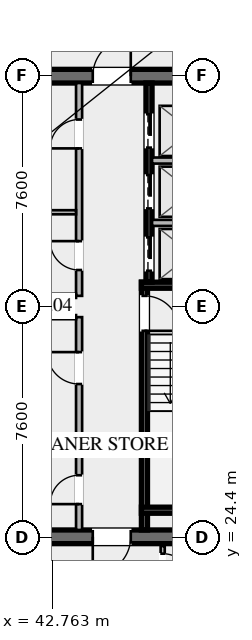
"""IFC4 building model, lengths in metres.
Left out: names, types, materials, properties, quantities, classifications, styles, units other than length and angle.
Written with IfcOpenShell. Run it as: python <this file> out.ifc"""

import sys

from ifc_helpers import new_model, si_unit, direction, frame, frame_2d, origin, place, context, subcontext, project, spatial, rectangle, extrude, element, fill, save


model = new_model("IFC4")
c1 = context("Model", 3, precision=1e-05, world=origin(), true_north=direction((0.0, 1.0)))
c2 = subcontext(c1, "Body", "Model", "MODEL_VIEW")
j1 = project(units=[si_unit("LENGTHUNIT", "METRE"), si_unit("PLANEANGLEUNIT", "RADIAN")], contexts=[c1])
p1 = place(None, origin())
s1 = spatial("IfcSite", under=j1, at=p1, CompositionType="ELEMENT")
p2 = place(p1, origin())
s2 = spatial("IfcBuilding", under=s1, at=p2, CompositionType="ELEMENT")
p3 = place(p2, frame((0.0, 0.0, 263.4)))
s3 = spatial("IfcBuildingStorey", under=s2, at=p3, CompositionType="ELEMENT", Elevation=263.4)
p4 = place(p3, frame((49.35, 24.425, 0.0), z_axis=(0.0, 0.0, 1.0), x_axis=(-1.0, 0.0, 0.0)))
e1 = element("IfcWall", 1, at=p4, inside=s3, PredefinedType="SHEAR", context=c2, shape_type="SweptSolid", body=[
    extrude(rectangle(XDim=14.7, YDim=0.45, at=frame_2d((7.35, 0.0))), origin(), (0.0, 0.0, 1.0), 3.55),
])
p5 = place(p4, frame((9.05, 0.0, 0.0)))
e2 = element("IfcOpeningElement", 2, at=p5, cuts=e1, PredefinedType="OPENING", context=c2, shape_type="SweptSolid", body=[
    extrude(rectangle(XDim=1.25, YDim=2.25, at=frame_2d((0.625, 1.125))), frame((0.0, 0.235, 0.0), z_axis=(0.0, -1.0, 0.0), x_axis=(1.0, 0.0, 0.0)), (0.0, 0.0, 1.0), 0.47),
])
p6 = place(p4, frame((4.0, 0.0, 0.0)))
e3 = element("IfcOpeningElement", 3, at=p6, cuts=e1, PredefinedType="OPENING", context=c2, shape_type="SweptSolid", body=[
    extrude(rectangle(XDim=1.25, YDim=2.25, at=frame_2d((0.625, 1.125))), frame((0.0, 0.235, 0.0), z_axis=(0.0, -1.0, 0.0), x_axis=(1.0, 0.0, 0.0)), (0.0, 0.0, 1.0), 0.47),
])
p7 = place(p3, frame((34.65, 39.575, 0.0), z_axis=(0.0, 0.0, 1.0), x_axis=(1.0, 0.0, 0.0)))
e4 = element("IfcWall", 4, at=p7, inside=s3, PredefinedType="SHEAR", context=c2, shape_type="SweptSolid", body=[
    extrude(rectangle(XDim=14.7, YDim=0.45, at=frame_2d((7.35, 0.0))), origin(), (0.0, 0.0, 1.0), 3.55),
])
p8 = place(p7, frame((4.4, 0.0, 0.0)))
e5 = element("IfcOpeningElement", 5, at=p8, cuts=e4, PredefinedType="OPENING", context=c2, shape_type="SweptSolid", body=[
    extrude(rectangle(XDim=1.25, YDim=2.25, at=frame_2d((0.625, 1.125))), frame((0.0, 0.235, 0.0), z_axis=(0.0, -1.0, 0.0), x_axis=(1.0, 0.0, 0.0)), (0.0, 0.0, 1.0), 0.47),
])
p9 = place(p7, frame((9.45, 0.0, 0.0)))
e6 = element("IfcOpeningElement", 6, at=p9, cuts=e4, PredefinedType="OPENING", context=c2, shape_type="SweptSolid", body=[
    extrude(rectangle(XDim=1.25, YDim=2.25, at=frame_2d((0.625, 1.125))), frame((0.0, 0.235, 0.0), z_axis=(0.0, -1.0, 0.0), x_axis=(1.0, 0.0, 0.0)), (0.0, 0.0, 1.0), 0.47),
])
p10 = place(p3, frame((45.8, 32.8, 0.0), z_axis=(0.0, 0.0, 1.0), x_axis=(0.0, -1.0, 0.0)))
e7 = element("IfcWall", 7, at=p10, inside=s3, PredefinedType="SHEAR", context=c2, shape_type="SweptSolid", body=[
    extrude(rectangle(XDim=8.15, YDim=0.2, at=frame_2d((4.075, 0.0))), origin(), (0.0, 0.0, 1.0), 3.37),
])
p11 = place(p10, frame((0.45, 0.0, 0.0)))
e8 = element("IfcOpeningElement", 8, at=p11, cuts=e7, PredefinedType="OPENING", context=c2, shape_type="SweptSolid", body=[
    extrude(rectangle(XDim=1.15, YDim=2.2, at=frame_2d((0.575, 1.1))), frame((0.0, 0.11, 0.0), z_axis=(0.0, -1.0, 0.0), x_axis=(1.0, 0.0, 0.0)), (0.0, 0.0, 1.0), 0.22),
])
for number, where, z_axis, x_axis in (
    (9, (45.7, 32.7, 0.0), (0.0, 0.0, 1.0), (1.0, 0.0, 0.0)),
    (10, (45.7, 25.3, 0.0), (0.0, 0.0, 1.0), (1.0, 0.0, 0.0)),
):
    element("IfcWall", number, at=place(p3, frame(where, z_axis=z_axis, x_axis=x_axis)), inside=s3, PredefinedType="SHEAR", context=c2, shape_type="SweptSolid", body=[
        extrude(rectangle(XDim=3.65, YDim=0.2, at=frame_2d((1.825, 0.0))), origin(), (0.0, 0.0, 1.0), 3.37),
    ])
p12 = place(p3, frame((45.95, 39.35, 0.0), z_axis=(0.0, 0.0, 1.0), x_axis=(0.0, -1.0, 0.0)))
e11 = element("IfcWall", 11, at=p12, inside=s3, PredefinedType="SHEAR", context=c2, shape_type="SweptSolid", body=[
    extrude(rectangle(XDim=6.55, YDim=0.2, at=frame_2d((3.275, 0.0))), origin(), (0.0, 0.0, 1.0), 3.37),
])
p13 = place(p12, frame((5.075, 0.0, 0.0)))
e12 = element("IfcOpeningElement", 12, at=p13, cuts=e11, PredefinedType="OPENING", context=c2, shape_type="SweptSolid", body=[
    extrude(rectangle(XDim=1.1, YDim=2.2, at=frame_2d((0.55, 1.1))), frame((0.0, 0.11, 0.0), z_axis=(0.0, -1.0, 0.0), x_axis=(1.0, 0.0, 0.0)), (0.0, 0.0, 1.0), 0.22),
])
p14 = place(p12, frame((3.025, 0.0, 0.0)))
e13 = element("IfcOpeningElement", 13, at=p14, cuts=e11, PredefinedType="OPENING", context=c2, shape_type="SweptSolid", body=[
    extrude(rectangle(XDim=1.1, YDim=2.2, at=frame_2d((0.55, 1.1))), frame((0.0, 0.11, 0.0), z_axis=(0.0, -1.0, 0.0), x_axis=(1.0, 0.0, 0.0)), (0.0, 0.0, 1.0), 0.22),
])
p15 = place(p12, frame((1.025, 0.0, 0.0)))
e14 = element("IfcOpeningElement", 14, at=p15, cuts=e11, PredefinedType="OPENING", context=c2, shape_type="SweptSolid", body=[
    extrude(rectangle(XDim=1.1, YDim=2.2, at=frame_2d((0.55, 1.1))), frame((0.0, 0.11, 0.0), z_axis=(0.0, -1.0, 0.0), x_axis=(1.0, 0.0, 0.0)), (0.0, 0.0, 1.0), 0.22),
])
for number, where, z_axis, x_axis in (
    (15, (46.05, 34.75, 0.0), (0.0, 0.0, 1.0), (1.0, 0.0, 0.0)),
    (16, (46.05, 36.8, 0.0), (0.0, 0.0, 1.0), (1.0, 0.0, 0.0)),
):
    element("IfcWall", number, at=place(p3, frame(where, z_axis=z_axis, x_axis=x_axis)), inside=s3, PredefinedType="SOLIDWALL", context=c2, shape_type="SweptSolid", body=[
        extrude(rectangle(XDim=3.3, YDim=0.2, at=frame_2d((1.65, 0.0))), origin(), (0.0, 0.0, 1.0), 3.37),
    ])
p16 = place(p3, frame((43.65, 24.65, 0.0), z_axis=(0.0, 0.0, 1.0), x_axis=(0.0, 1.0, 0.0)))
e17 = element("IfcWall", 17, at=p16, inside=s3, PredefinedType="SOLIDWALL", context=c2, shape_type="SweptSolid", body=[
    extrude(rectangle(XDim=7.0, YDim=0.2, at=frame_2d((3.5, 0.0))), origin(), (0.0, 0.0, 1.0), 2.723),
])
p17 = place(p16, frame((0.85, 0.0, 0.0)))
e18 = element("IfcOpeningElement", 18, at=p17, cuts=e17, PredefinedType="OPENING", context=c2, shape_type="SweptSolid", body=[
    extrude(rectangle(XDim=0.95, YDim=2.05, at=frame_2d((0.475, 1.025))), frame((0.0, 0.11, 0.0), z_axis=(0.0, -1.0, 0.0), x_axis=(1.0, 0.0, 0.0)), (0.0, 0.0, 1.0), 0.22),
])
p18 = place(p16, frame((4.8, 0.0, 0.0)))
e19 = element("IfcOpeningElement", 19, at=p18, cuts=e17, PredefinedType="OPENING", context=c2, shape_type="SweptSolid", body=[
    extrude(rectangle(XDim=1.05, YDim=2.2, at=frame_2d((0.525, 1.1))), frame((0.0, 0.11, 0.0), z_axis=(0.0, -1.0, 0.0), x_axis=(1.0, 0.0, 0.0)), (0.0, 0.0, 1.0), 0.22),
])
for number, where, z_axis, x_axis in (
    (20, (41.67, 31.65, 0.0), (0.0, 0.0, 1.0), (1.0, 0.0, 0.0)),
    (21, (41.67, 27.6, 0.0), (0.0, 0.0, 1.0), (1.0, 0.0, 0.0)),
):
    element("IfcWall", number, at=place(p3, frame(where, z_axis=z_axis, x_axis=x_axis)), inside=s3, PredefinedType="PARTITIONING", context=c2, shape_type="SweptSolid", body=[
        extrude(rectangle(XDim=1.88, YDim=0.135, at=frame_2d((0.94, 0.0))), origin(), (0.0, 0.0, 1.0), 2.723),
    ])
p19 = place(p3, frame((43.65, 32.35, 0.0), z_axis=(0.0, 0.0, 1.0), x_axis=(0.0, 1.0, 0.0)))
e22 = element("IfcWall", 22, at=p19, inside=s3, PredefinedType="SOLIDWALL", context=c2, shape_type="SweptSolid", body=[
    extrude(rectangle(XDim=7.0, YDim=0.2, at=frame_2d((3.5, 0.0))), origin(), (0.0, 0.0, 1.0), 2.723),
])
p20 = place(p19, frame((0.85, 0.0, 0.0)))
e23 = element("IfcOpeningElement", 23, at=p20, cuts=e22, PredefinedType="OPENING", context=c2, shape_type="SweptSolid", body=[
    extrude(rectangle(XDim=0.95, YDim=2.05, at=frame_2d((0.475, 1.025))), frame((0.0, 0.11, 0.0), z_axis=(0.0, -1.0, 0.0), x_axis=(1.0, 0.0, 0.0)), (0.0, 0.0, 1.0), 0.22),
])
p21 = place(p19, frame((4.85, 0.0, 0.0)))
e24 = element("IfcOpeningElement", 24, at=p21, cuts=e22, PredefinedType="OPENING", context=c2, shape_type="SweptSolid", body=[
    extrude(rectangle(XDim=0.95, YDim=2.05, at=frame_2d((0.475, 1.025))), frame((0.0, 0.11, 0.0), z_axis=(0.0, -1.0, 0.0), x_axis=(1.0, 0.0, 0.0)), (0.0, 0.0, 1.0), 0.22),
])
for number, where, z_axis, x_axis in (
    (25, (41.67, 32.35, 0.0), (0.0, 0.0, 1.0), (1.0, 0.0, 0.0)),
    (26, (41.67, 35.1, 0.0), (0.0, 0.0, 1.0), (1.0, 0.0, 0.0)),
):
    element("IfcWall", number, at=place(p3, frame(where, z_axis=z_axis, x_axis=x_axis)), inside=s3, PredefinedType="PARTITIONING", context=c2, shape_type="SweptSolid", body=[
        extrude(rectangle(XDim=1.88, YDim=0.135, at=frame_2d((0.94, 0.0))), origin(), (0.0, 0.0, 1.0), 2.723),
    ])
p22 = place(p3, frame((46.4, 24.12, 0.0), z_axis=(0.0, 0.0, 1.0), x_axis=(0.0, -1.0, 0.0)))
e27 = element("IfcWall", 27, at=p22, inside=s3, PredefinedType="PARTITIONING", context=c2, shape_type="SweptSolid", body=[
    extrude(rectangle(XDim=1.49, YDim=0.135, at=frame_2d((0.745, 0.0))), origin(), (0.0, 0.0, 1.0), 2.723),
])
p23 = place(p22, frame((0.25, 0.0, 0.0)))
e28 = element("IfcOpeningElement", 28, at=p23, cuts=e27, PredefinedType="OPENING", context=c2, shape_type="SweptSolid", body=[
    extrude(rectangle(XDim=0.95, YDim=2.05, at=frame_2d((0.475, 1.025))), frame((0.0, 0.077, 0.0), z_axis=(0.0, -1.0, 0.0), x_axis=(1.0, 0.0, 0.0)), (0.0, 0.0, 1.0), 0.155),
])
p24 = place(p9, origin())
e29 = element("IfcDoor", 29, at=p24, inside=s3, OperationType="SINGLE_SWING_RIGHT", PredefinedType="DOOR", context=c2, shape_type="SweptSolid", body=[
    extrude(rectangle(XDim=1.25, YDim=2.25, at=frame_2d((0.625, 1.125))), frame((0.0, 0.025, 0.0), z_axis=(0.0, -1.0, 0.0), x_axis=(1.0, 0.0, 0.0)), (0.0, 0.0, 1.0), 0.05),
])
fill(e6, e29)
p25 = place(p6, origin())
e30 = element("IfcDoor", 30, at=p25, inside=s3, OperationType="SINGLE_SWING_RIGHT", PredefinedType="DOOR", context=c2, shape_type="SweptSolid", body=[
    extrude(rectangle(XDim=1.25, YDim=2.25, at=frame_2d((0.625, 1.125))), frame((0.0, 0.025, 0.0), z_axis=(0.0, -1.0, 0.0), x_axis=(1.0, 0.0, 0.0)), (0.0, 0.0, 1.0), 0.05),
])
fill(e3, e30)
p26 = place(p11, origin())
e31 = element("IfcDoor", 31, at=p26, inside=s3, OperationType="SINGLE_SWING_RIGHT", PredefinedType="DOOR", context=c2, shape_type="SweptSolid", body=[
    extrude(rectangle(XDim=1.15, YDim=2.2, at=frame_2d((0.575, 1.1))), frame((0.0, 0.025, 0.0), z_axis=(0.0, -1.0, 0.0), x_axis=(1.0, 0.0, 0.0)), (0.0, 0.0, 1.0), 0.05),
])
fill(e8, e31)
p27 = place(p17, origin())
e32 = element("IfcDoor", 32, at=p27, inside=s3, OperationType="SINGLE_SWING_LEFT", PredefinedType="DOOR", context=c2, shape_type="SweptSolid", body=[
    extrude(rectangle(XDim=0.95, YDim=2.05, at=frame_2d((0.475, 1.025))), frame((0.0, 0.025, 0.0), z_axis=(0.0, -1.0, 0.0), x_axis=(1.0, 0.0, 0.0)), (0.0, 0.0, 1.0), 0.05),
])
fill(e18, e32)
p28 = place(p18, origin())
e33 = element("IfcDoor", 33, at=p28, inside=s3, OperationType="SINGLE_SWING_RIGHT", PredefinedType="DOOR", context=c2, shape_type="SweptSolid", body=[
    extrude(rectangle(XDim=1.05, YDim=2.2, at=frame_2d((0.525, 1.1))), frame((0.0, 0.025, 0.0), z_axis=(0.0, -1.0, 0.0), x_axis=(1.0, 0.0, 0.0)), (0.0, 0.0, 1.0), 0.05),
])
fill(e19, e33)
p29 = place(p20, origin())
e34 = element("IfcDoor", 34, at=p29, inside=s3, OperationType="SINGLE_SWING_RIGHT", PredefinedType="DOOR", context=c2, shape_type="SweptSolid", body=[
    extrude(rectangle(XDim=0.95, YDim=2.05, at=frame_2d((0.475, 1.025))), frame((0.0, 0.025, 0.0), z_axis=(0.0, -1.0, 0.0), x_axis=(1.0, 0.0, 0.0)), (0.0, 0.0, 1.0), 0.05),
])
fill(e23, e34)
p30 = place(p21, origin())
e35 = element("IfcDoor", 35, at=p30, inside=s3, OperationType="SINGLE_SWING_LEFT", PredefinedType="DOOR", context=c2, shape_type="SweptSolid", body=[
    extrude(rectangle(XDim=0.95, YDim=2.05, at=frame_2d((0.475, 1.025))), frame((0.0, 0.025, 0.0), z_axis=(0.0, -1.0, 0.0), x_axis=(1.0, 0.0, 0.0)), (0.0, 0.0, 1.0), 0.05),
])
fill(e24, e35)
p31 = place(p23, origin())
e36 = element("IfcDoor", 36, at=p31, inside=s3, OperationType="SINGLE_SWING_RIGHT", PredefinedType="DOOR", context=c2, shape_type="SweptSolid", body=[
    extrude(rectangle(XDim=0.95, YDim=2.05, at=frame_2d((0.475, 1.025))), frame((0.0, 0.025, 0.0), z_axis=(0.0, -1.0, 0.0), x_axis=(1.0, 0.0, 0.0)), (0.0, 0.0, 1.0), 0.05),
])
fill(e28, e36)
p32 = place(p13, origin())
e37 = element("IfcDoor", 37, at=p32, inside=s3, OperationType="SLIDING_TO_LEFT", PredefinedType="DOOR", context=c2, shape_type="SweptSolid", body=[
    extrude(rectangle(XDim=1.1, YDim=2.2, at=frame_2d((0.55, 1.1))), frame((0.0, 0.025, 0.0), z_axis=(0.0, -1.0, 0.0), x_axis=(1.0, 0.0, 0.0)), (0.0, 0.0, 1.0), 0.05),
])
fill(e12, e37)
p33 = place(p14, origin())
e38 = element("IfcDoor", 38, at=p33, inside=s3, OperationType="SLIDING_TO_LEFT", PredefinedType="DOOR", context=c2, shape_type="SweptSolid", body=[
    extrude(rectangle(XDim=1.1, YDim=2.2, at=frame_2d((0.55, 1.1))), frame((0.0, 0.025, 0.0), z_axis=(0.0, -1.0, 0.0), x_axis=(1.0, 0.0, 0.0)), (0.0, 0.0, 1.0), 0.05),
])
fill(e13, e38)
p34 = place(p15, origin())
e39 = element("IfcDoor", 39, at=p34, inside=s3, OperationType="SLIDING_TO_LEFT", PredefinedType="DOOR", context=c2, shape_type="SweptSolid", body=[
    extrude(rectangle(XDim=1.1, YDim=2.2, at=frame_2d((0.55, 1.1))), frame((0.0, 0.025, 0.0), z_axis=(0.0, -1.0, 0.0), x_axis=(1.0, 0.0, 0.0)), (0.0, 0.0, 1.0), 0.05),
])
fill(e14, e39)
save(model, sys.argv[1])
